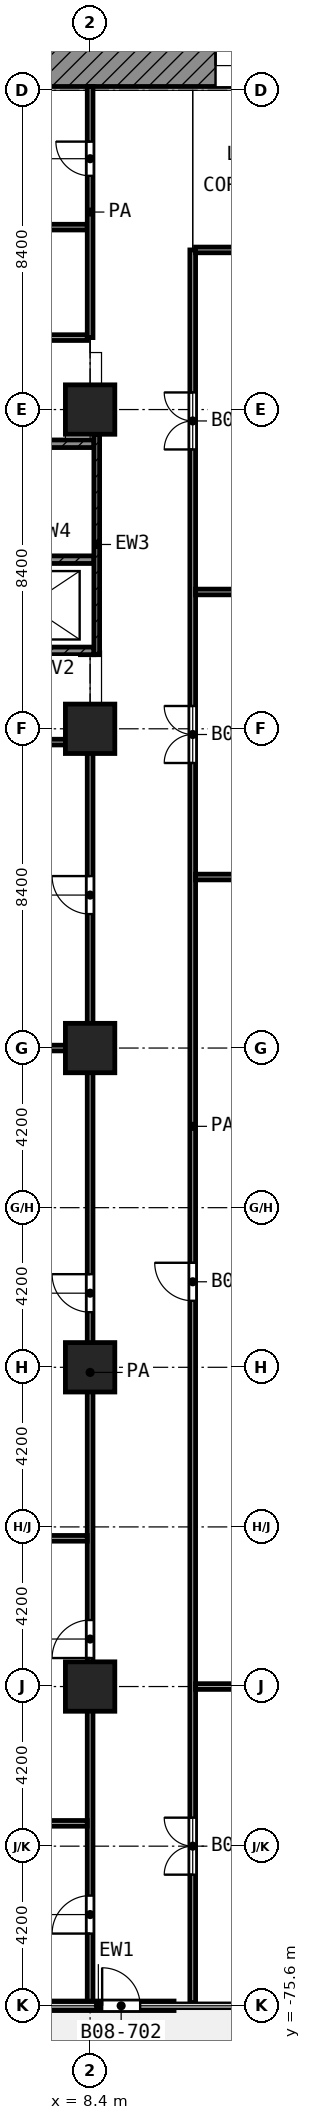
"""IFC4 building model, lengths in metres.
Left out: names, types, materials, properties, quantities, classifications, styles, units other than length and angle.
Written with IfcOpenShell. Run it as: python <this file> out.ifc"""

import sys

from ifc_helpers import new_model, si_unit, direction, frame, frame_2d, origin, origin_2d, place, context, subcontext, project, spatial, rectangle, extrude, element, fill, save


model = new_model("IFC4")
c1 = context("Model", 3, precision=1e-05, world=origin(), true_north=direction((0.0, 1.0)))
c2 = subcontext(c1, "Body", "Model", "MODEL_VIEW")
j1 = project(units=[si_unit("LENGTHUNIT", "METRE"), si_unit("PLANEANGLEUNIT", "RADIAN")], contexts=[c1])
p1 = place(None, origin())
s1 = spatial("IfcSite", under=j1, at=p1, CompositionType="ELEMENT")
p2 = place(p1, origin())
s2 = spatial("IfcBuilding", under=s1, at=p2, CompositionType="ELEMENT")
p3 = place(p2, frame((0.0, 0.0, 39.2)))
s3 = spatial("IfcBuildingStorey", under=s2, at=p3, CompositionType="ELEMENT", Elevation=39.2)
for number, where, z_axis, x_axis in (
    (1, (8.4, -33.6, 0.0), (0.0, 0.0, 1.0), (1.0, 0.0, 0.0)),
    (2, (8.4, -42.0, 0.0), (0.0, 0.0, 1.0), (1.0, 0.0, 0.0)),
    (3, (8.4, -50.4, 0.0), (0.0, 0.0, 1.0), (1.0, 0.0, 0.0)),
    (4, (8.4, -58.8, 0.0), (0.0, 0.0, 1.0), (1.0, 0.0, 0.0)),
    (5, (8.4, -67.2, 0.0), (0.0, 0.0, 1.0), (1.0, 0.0, 0.0)),
):
    element("IfcColumn", number, at=place(p3, frame(where, z_axis=z_axis, x_axis=x_axis)), inside=s3, PredefinedType="COLUMN", context=c2, shape_type="SweptSolid", body=[
        extrude(rectangle(XDim=1.3, YDim=1.3, at=origin_2d()), origin(), (0.0, 0.0, 1.0), 4.2),
    ])
p4 = place(p3, frame((6.625, -75.6, 0.0), z_axis=(0.0, 0.0, 1.0), x_axis=(1.0, 0.0, 0.0)))
e6 = element("IfcWall", 6, at=p4, inside=s3, PredefinedType="SOLIDWALL", context=c2, shape_type="SweptSolid", body=[
    extrude(rectangle(XDim=3.983, YDim=0.25, at=frame_2d((1.992, 0.0))), origin(), (0.0, 0.0, 1.0), 3.78),
])
p5 = place(p4, frame((2.092, 0.0, 0.0)))
e7 = element("IfcOpeningElement", 7, at=p5, cuts=e6, PredefinedType="OPENING", context=c2, shape_type="SweptSolid", body=[
    extrude(rectangle(XDim=1.0, YDim=2.1, at=frame_2d((0.5, 1.05))), frame((0.0, 0.135, 0.0), z_axis=(0.0, -1.0, 0.0), x_axis=(1.0, 0.0, 0.0)), (0.0, 0.0, 1.0), 0.27),
])
p6 = place(p3, frame((5.4, -24.55, 0.0), z_axis=(0.0, 0.0, 1.0), x_axis=(1.0, 0.0, 0.0)))
e8 = element("IfcWall", 8, at=p6, inside=s3, PredefinedType="SHEAR", context=c2, shape_type="SweptSolid", body=[
    extrude(rectangle(XDim=18.6, YDim=1.1, at=frame_2d((9.3, 0.0))), origin(), (0.0, 0.0, 1.0), 3.9),
])
p7 = place(p6, frame((6.3, 0.0, 0.0)))
e9 = element("IfcOpeningElement", 9, at=p7, cuts=e8, PredefinedType="OPENING", context=c2, shape_type="SweptSolid", body=[
    extrude(rectangle(XDim=1.8, YDim=2.1, at=frame_2d((0.9, 1.05))), frame((0.0, 0.56, 0.0), z_axis=(0.0, -1.0, 0.0), x_axis=(1.0, 0.0, 0.0)), (0.0, 0.0, 1.0), 1.12),
])
p8 = place(p3, frame((8.575, -40.05, 0.0), z_axis=(0.0, 0.0, 1.0), x_axis=(0.0, 1.0, 0.0)))
e10 = element("IfcWall", 10, at=p8, inside=s3, PredefinedType="SHEAR", context=c2, shape_type="SweptSolid", body=[
    extrude(rectangle(XDim=5.8, YDim=0.15, at=frame_2d((2.9, 0.0))), origin(), (0.0, 0.0, 1.0), 3.9),
])
p9 = place(p3, frame((0.45, -34.5, 0.0), z_axis=(0.0, 0.0, 1.0), x_axis=(1.0, 0.0, 0.0)))
e11 = element("IfcWall", 11, at=p9, inside=s3, PredefinedType="SHEAR", context=c2, shape_type="SweptSolid", body=[
    extrude(rectangle(XDim=8.05, YDim=0.2, at=frame_2d((4.025, 0.0))), origin(), (0.0, 0.0, 1.0), 3.9),
])
p10 = place(p9, frame((0.75, 0.0, 0.0)))
e12 = element("IfcOpeningElement", 12, at=p10, cuts=e11, PredefinedType="OPENING", context=c2, shape_type="SweptSolid", body=[
    extrude(rectangle(XDim=1.1, YDim=2.1, at=frame_2d((0.55, 1.05))), frame((0.0, 0.11, 0.0), z_axis=(0.0, -1.0, 0.0), x_axis=(1.0, 0.0, 0.0)), (0.0, 0.0, 1.0), 0.22),
])
p11 = place(p3, frame((0.45, -37.55, 0.0), z_axis=(0.0, 0.0, 1.0), x_axis=(1.0, 0.0, 0.0)))
e13 = element("IfcWall", 13, at=p11, inside=s3, PredefinedType="SHEAR", context=c2, shape_type="SweptSolid", body=[
    extrude(rectangle(XDim=8.05, YDim=0.2, at=frame_2d((4.025, 0.0))), origin(), (0.0, 0.0, 1.0), 3.9),
])
p12 = place(p11, frame((0.1, 0.0, 0.0)))
e14 = element("IfcOpeningElement", 14, at=p12, cuts=e13, PredefinedType="OPENING", context=c2, shape_type="SweptSolid", body=[
    extrude(rectangle(XDim=1.1, YDim=2.1, at=frame_2d((0.55, 1.05))), frame((0.0, 0.11, 0.0), z_axis=(0.0, -1.0, 0.0), x_axis=(1.0, 0.0, 0.0)), (0.0, 0.0, 1.0), 0.22),
])
p13 = place(p3, frame((0.45, -39.95, 0.0), z_axis=(0.0, 0.0, 1.0), x_axis=(1.0, 0.0, 0.0)))
e15 = element("IfcWall", 15, at=p13, inside=s3, PredefinedType="SHEAR", context=c2, shape_type="SweptSolid", body=[
    extrude(rectangle(XDim=8.05, YDim=0.2, at=frame_2d((4.025, 0.0))), origin(), (0.0, 0.0, 1.0), 3.9),
])
p14 = place(p13, frame((2.0, 0.0, 0.0)))
e16 = element("IfcOpeningElement", 16, at=p14, cuts=e15, PredefinedType="OPENING", context=c2, shape_type="SweptSolid", body=[
    extrude(rectangle(XDim=1.1, YDim=2.1, at=frame_2d((0.55, 1.05))), frame((0.0, 0.11, 0.0), z_axis=(0.0, -1.0, 0.0), x_axis=(1.0, 0.0, 0.0)), (0.0, 0.0, 1.0), 0.22),
])
p15 = place(p3, frame((1.313, -70.8, 0.0), z_axis=(0.0, 0.0, 1.0), x_axis=(1.0, 0.0, 0.0)))
e17 = element("IfcWall", 17, at=p15, inside=s3, PredefinedType="PARTITIONING", context=c2, shape_type="SweptSolid", body=[
    extrude(rectangle(XDim=7.012, YDim=0.15, at=frame_2d((3.506, 0.0))), origin(), (0.0, 0.0, 1.0), 3.9),
])
p16 = place(p3, frame((11.175, -67.2, 0.0), z_axis=(0.0, 0.0, 1.0), x_axis=(1.0, 0.0, 0.0)))
e18 = element("IfcWall", 18, at=p16, inside=s3, PredefinedType="PARTITIONING", context=c2, shape_type="SweptSolid", body=[
    extrude(rectangle(XDim=13.945, YDim=0.15, at=frame_2d((6.973, 0.0))), origin(), (0.0, 0.0, 1.0), 3.9),
])
for number, where, z_axis, x_axis in (
    (19, (0.08, -63.3, 0.0), (0.0, 0.0, 1.0), (1.0, 0.0, 0.0)),
    (20, (0.08, -50.4, 0.0), (0.0, 0.0, 1.0), (1.0, 0.0, 0.0)),
):
    element("IfcWall", number, at=place(p3, frame(where, z_axis=z_axis, x_axis=x_axis)), inside=s3, PredefinedType="PARTITIONING", context=c2, shape_type="SweptSolid", body=[
        extrude(rectangle(XDim=8.245, YDim=0.15, at=frame_2d((4.123, 0.0))), origin(), (0.0, 0.0, 1.0), 3.9),
    ])
p17 = place(p3, frame((11.175, -45.9, 0.0), z_axis=(0.0, 0.0, 1.0), x_axis=(1.0, 0.0, 0.0)))
e21 = element("IfcWall", 21, at=p17, inside=s3, PredefinedType="PARTITIONING", context=c2, shape_type="SweptSolid", body=[
    extrude(rectangle(XDim=13.945, YDim=0.15, at=frame_2d((6.973, 0.0))), origin(), (0.0, 0.0, 1.0), 3.9),
])
p18 = place(p3, frame((2.325, -42.35, 0.0), z_axis=(0.0, 0.0, 1.0), x_axis=(1.0, 0.0, 0.0)))
e22 = element("IfcWall", 22, at=p18, inside=s3, PredefinedType="PARTITIONING", context=c2, shape_type="SweptSolid", body=[
    extrude(rectangle(XDim=6.0, YDim=0.15, at=frame_2d((3.0, 0.0))), origin(), (0.0, 0.0, 1.0), 3.9),
])
p19 = place(p3, frame((11.175, -38.4, 0.0), z_axis=(0.0, 0.0, 1.0), x_axis=(1.0, 0.0, 0.0)))
e23 = element("IfcWall", 23, at=p19, inside=s3, PredefinedType="PARTITIONING", context=c2, shape_type="SweptSolid", body=[
    extrude(rectangle(XDim=13.945, YDim=0.15, at=frame_2d((6.973, 0.0))), origin(), (0.0, 0.0, 1.0), 3.9),
])
p20 = place(p3, frame((0.08, -31.707, 0.0), z_axis=(0.0, 0.0, 1.0), x_axis=(1.0, 0.0, 0.0)))
e24 = element("IfcWall", 24, at=p20, inside=s3, PredefinedType="PARTITIONING", context=c2, shape_type="SweptSolid", body=[
    extrude(rectangle(XDim=8.245, YDim=0.15, at=frame_2d((4.123, 0.0))), origin(), (0.0, 0.0, 1.0), 3.9),
])
p21 = place(p20, frame((3.62, 0.0, 0.0)))
e25 = element("IfcOpeningElement", 25, at=p21, cuts=e24, PredefinedType="OPENING", context=c2, shape_type="SweptSolid", body=[
    extrude(rectangle(XDim=1.0, YDim=2.1, at=frame_2d((0.5, 1.05))), frame((0.0, 0.085, 0.0), z_axis=(0.0, -1.0, 0.0), x_axis=(1.0, 0.0, 0.0)), (0.0, 0.0, 1.0), 0.17),
])
p22 = place(p3, frame((11.175, -29.4, 0.0), z_axis=(0.0, 0.0, 1.0), x_axis=(1.0, 0.0, 0.0)))
e26 = element("IfcWall", 26, at=p22, inside=s3, PredefinedType="PARTITIONING", context=c2, shape_type="SweptSolid", body=[
    extrude(rectangle(XDim=2.925, YDim=0.15, at=frame_2d((1.462, 0.0))), origin(), (0.0, 0.0, 1.0), 3.9),
])
p23 = place(p3, frame((0.08, -28.8, 0.0), z_axis=(0.0, 0.0, 1.0), x_axis=(1.0, 0.0, 0.0)))
e27 = element("IfcWall", 27, at=p23, inside=s3, PredefinedType="PARTITIONING", context=c2, shape_type="SweptSolid", body=[
    extrude(rectangle(XDim=8.245, YDim=0.15, at=frame_2d((4.123, 0.0))), origin(), (0.0, 0.0, 1.0), 3.9),
])
p24 = place(p3, frame((8.4, -75.52, 0.0), z_axis=(0.0, 0.0, 1.0), x_axis=(0.0, 1.0, 0.0)))
e28 = element("IfcWall", 28, at=p24, inside=s3, PredefinedType="PARTITIONING", context=c2, shape_type="SweptSolid", body=[
    extrude(rectangle(XDim=33.17, YDim=0.15, at=frame_2d((16.585, 0.0))), origin(), (0.0, 0.0, 1.0), 3.9),
])
p25 = place(p24, frame((28.645, 0.0, 0.0)))
e29 = element("IfcOpeningElement", 29, at=p25, cuts=e28, PredefinedType="OPENING", context=c2, shape_type="SweptSolid", body=[
    extrude(rectangle(XDim=1.0, YDim=2.1, at=frame_2d((0.5, 1.05))), frame((0.0, 0.085, 0.0), z_axis=(0.0, -1.0, 0.0), x_axis=(1.0, 0.0, 0.0)), (0.0, 0.0, 1.0), 0.17),
])
p26 = place(p24, frame((18.17, 0.0, 0.0)))
e30 = element("IfcOpeningElement", 30, at=p26, cuts=e28, PredefinedType="OPENING", context=c2, shape_type="SweptSolid", body=[
    extrude(rectangle(XDim=1.0, YDim=2.1, at=frame_2d((0.5, 1.05))), frame((0.0, 0.085, 0.0), z_axis=(0.0, -1.0, 0.0), x_axis=(1.0, 0.0, 0.0)), (0.0, 0.0, 1.0), 0.17),
])
p27 = place(p24, frame((9.07, 0.0, 0.0)))
e31 = element("IfcOpeningElement", 31, at=p27, cuts=e28, PredefinedType="OPENING", context=c2, shape_type="SweptSolid", body=[
    extrude(rectangle(XDim=1.0, YDim=2.1, at=frame_2d((0.5, 1.05))), frame((0.0, 0.085, 0.0), z_axis=(0.0, -1.0, 0.0), x_axis=(1.0, 0.0, 0.0)), (0.0, 0.0, 1.0), 0.17),
])
p28 = place(p24, frame((1.82, 0.0, 0.0)))
e32 = element("IfcOpeningElement", 32, at=p28, cuts=e28, PredefinedType="OPENING", context=c2, shape_type="SweptSolid", body=[
    extrude(rectangle(XDim=1.0, YDim=2.1, at=frame_2d((0.5, 1.05))), frame((0.0, 0.085, 0.0), z_axis=(0.0, -1.0, 0.0), x_axis=(1.0, 0.0, 0.0)), (0.0, 0.0, 1.0), 0.17),
])
p29 = place(p3, frame((8.4, -31.707, 0.0), z_axis=(0.0, 0.0, 1.0), x_axis=(0.0, 1.0, 0.0)))
e33 = element("IfcWall", 33, at=p29, inside=s3, PredefinedType="PARTITIONING", context=c2, shape_type="SweptSolid", body=[
    extrude(rectangle(XDim=6.607, YDim=0.15, at=frame_2d((3.303, 0.0))), origin(), (0.0, 0.0, 1.0), 3.9),
])
p30 = place(p29, frame((4.257, 0.0, 0.0)))
e34 = element("IfcOpeningElement", 34, at=p30, cuts=e33, PredefinedType="OPENING", context=c2, shape_type="SweptSolid", body=[
    extrude(rectangle(XDim=0.9, YDim=2.1, at=frame_2d((0.45, 1.05))), frame((0.0, 0.085, 0.0), z_axis=(0.0, -1.0, 0.0), x_axis=(1.0, 0.0, 0.0)), (0.0, 0.0, 1.0), 0.17),
])
p31 = place(p3, frame((11.1, -75.52, 0.0), z_axis=(0.0, 0.0, 1.0), x_axis=(0.0, 1.0, 0.0)))
e35 = element("IfcWall", 35, at=p31, inside=s3, PredefinedType="PARTITIONING", context=c2, shape_type="SweptSolid", body=[
    extrude(rectangle(XDim=46.12, YDim=0.15, at=frame_2d((23.06, 0.0))), origin(), (0.0, 0.0, 1.0), 3.9),
])
p32 = place(p31, frame((40.87, 0.0, 0.0)))
e36 = element("IfcOpeningElement", 36, at=p32, cuts=e35, PredefinedType="OPENING", context=c2, shape_type="SweptSolid", body=[
    extrude(rectangle(XDim=1.5, YDim=2.1, at=frame_2d((0.75, 1.05))), frame((0.0, 0.085, 0.0), z_axis=(0.0, -1.0, 0.0), x_axis=(1.0, 0.0, 0.0)), (0.0, 0.0, 1.0), 0.17),
])
p33 = place(p31, frame((32.62, 0.0, 0.0)))
e37 = element("IfcOpeningElement", 37, at=p33, cuts=e35, PredefinedType="OPENING", context=c2, shape_type="SweptSolid", body=[
    extrude(rectangle(XDim=1.5, YDim=2.1, at=frame_2d((0.75, 1.05))), frame((0.0, 0.085, 0.0), z_axis=(0.0, -1.0, 0.0), x_axis=(1.0, 0.0, 0.0)), (0.0, 0.0, 1.0), 0.17),
])
p34 = place(p31, frame((18.47, 0.0, 0.0)))
e38 = element("IfcOpeningElement", 38, at=p34, cuts=e35, PredefinedType="OPENING", context=c2, shape_type="SweptSolid", body=[
    extrude(rectangle(XDim=1.0, YDim=2.1, at=frame_2d((0.5, 1.05))), frame((0.0, 0.085, 0.0), z_axis=(0.0, -1.0, 0.0), x_axis=(1.0, 0.0, 0.0)), (0.0, 0.0, 1.0), 0.17),
])
p35 = place(p31, frame((3.37, 0.0, 0.0)))
e39 = element("IfcOpeningElement", 39, at=p35, cuts=e35, PredefinedType="OPENING", context=c2, shape_type="SweptSolid", body=[
    extrude(rectangle(XDim=1.5, YDim=2.1, at=frame_2d((0.75, 1.05))), frame((0.0, 0.085, 0.0), z_axis=(0.0, -1.0, 0.0), x_axis=(1.0, 0.0, 0.0)), (0.0, 0.0, 1.0), 0.17),
])
p36 = place(p5, origin())
e40 = element("IfcDoor", 40, at=p36, inside=s3, OperationType="SINGLE_SWING_LEFT", PredefinedType="DOOR", context=c2, shape_type="SweptSolid", body=[
    extrude(rectangle(XDim=1.0, YDim=2.1, at=frame_2d((0.5, 1.05))), frame((0.0, 0.025, 0.0), z_axis=(0.0, -1.0, 0.0), x_axis=(1.0, 0.0, 0.0)), (0.0, 0.0, 1.0), 0.05),
])
fill(e7, e40)
p37 = place(p7, origin())
e41 = element("IfcDoor", 41, at=p37, inside=s3, OperationType="DOUBLE_DOOR_SINGLE_SWING", PredefinedType="DOOR", context=c2, shape_type="SweptSolid", body=[
    extrude(rectangle(XDim=1.8, YDim=2.1, at=frame_2d((0.9, 1.05))), frame((0.0, 0.025, 0.0), z_axis=(0.0, -1.0, 0.0), x_axis=(1.0, 0.0, 0.0)), (0.0, 0.0, 1.0), 0.05),
])
fill(e9, e41)
p38 = place(p30, origin())
e42 = element("IfcDoor", 42, at=p38, inside=s3, OperationType="SINGLE_SWING_RIGHT", PredefinedType="DOOR", context=c2, shape_type="SweptSolid", body=[
    extrude(rectangle(XDim=0.9, YDim=2.1, at=frame_2d((0.45, 1.05))), frame((0.0, 0.025, 0.0), z_axis=(0.0, -1.0, 0.0), x_axis=(1.0, 0.0, 0.0)), (0.0, 0.0, 1.0), 0.05),
])
fill(e34, e42)
p39 = place(p25, origin())
e43 = element("IfcDoor", 43, at=p39, inside=s3, OperationType="SINGLE_SWING_RIGHT", PredefinedType="DOOR", context=c2, shape_type="SweptSolid", body=[
    extrude(rectangle(XDim=1.0, YDim=2.1, at=frame_2d((0.5, 1.05))), frame((0.0, 0.025, 0.0), z_axis=(0.0, -1.0, 0.0), x_axis=(1.0, 0.0, 0.0)), (0.0, 0.0, 1.0), 0.05),
])
fill(e29, e43)
p40 = place(p26, origin())
e44 = element("IfcDoor", 44, at=p40, inside=s3, OperationType="SINGLE_SWING_RIGHT", PredefinedType="DOOR", context=c2, shape_type="SweptSolid", body=[
    extrude(rectangle(XDim=1.0, YDim=2.1, at=frame_2d((0.5, 1.05))), frame((0.0, 0.025, 0.0), z_axis=(0.0, -1.0, 0.0), x_axis=(1.0, 0.0, 0.0)), (0.0, 0.0, 1.0), 0.05),
])
fill(e30, e44)
p41 = place(p27, origin())
e45 = element("IfcDoor", 45, at=p41, inside=s3, OperationType="SINGLE_SWING_LEFT", PredefinedType="DOOR", context=c2, shape_type="SweptSolid", body=[
    extrude(rectangle(XDim=1.0, YDim=2.1, at=frame_2d((0.5, 1.05))), frame((0.0, 0.025, 0.0), z_axis=(0.0, -1.0, 0.0), x_axis=(1.0, 0.0, 0.0)), (0.0, 0.0, 1.0), 0.05),
])
fill(e31, e45)
p42 = place(p28, origin())
e46 = element("IfcDoor", 46, at=p42, inside=s3, OperationType="SINGLE_SWING_LEFT", PredefinedType="DOOR", context=c2, shape_type="SweptSolid", body=[
    extrude(rectangle(XDim=1.0, YDim=2.1, at=frame_2d((0.5, 1.05))), frame((0.0, 0.025, 0.0), z_axis=(0.0, -1.0, 0.0), x_axis=(1.0, 0.0, 0.0)), (0.0, 0.0, 1.0), 0.05),
])
fill(e32, e46)
p43 = place(p32, origin())
e47 = element("IfcDoor", 47, at=p43, inside=s3, OperationType="DOUBLE_DOOR_SINGLE_SWING", PredefinedType="DOOR", context=c2, shape_type="SweptSolid", body=[
    extrude(rectangle(XDim=1.5, YDim=2.1, at=frame_2d((0.75, 1.05))), frame((0.0, 0.025, 0.0), z_axis=(0.0, -1.0, 0.0), x_axis=(1.0, 0.0, 0.0)), (0.0, 0.0, 1.0), 0.05),
])
fill(e36, e47)
p44 = place(p33, origin())
e48 = element("IfcDoor", 48, at=p44, inside=s3, OperationType="DOUBLE_DOOR_SINGLE_SWING", PredefinedType="DOOR", context=c2, shape_type="SweptSolid", body=[
    extrude(rectangle(XDim=1.5, YDim=2.1, at=frame_2d((0.75, 1.05))), frame((0.0, 0.025, 0.0), z_axis=(0.0, -1.0, 0.0), x_axis=(1.0, 0.0, 0.0)), (0.0, 0.0, 1.0), 0.05),
])
fill(e37, e48)
p45 = place(p34, origin())
e49 = element("IfcDoor", 49, at=p45, inside=s3, OperationType="SINGLE_SWING_RIGHT", PredefinedType="DOOR", context=c2, shape_type="SweptSolid", body=[
    extrude(rectangle(XDim=1.0, YDim=2.1, at=frame_2d((0.5, 1.05))), frame((0.0, 0.025, 0.0), z_axis=(0.0, -1.0, 0.0), x_axis=(1.0, 0.0, 0.0)), (0.0, 0.0, 1.0), 0.05),
])
fill(e38, e49)
p46 = place(p35, origin())
e50 = element("IfcDoor", 50, at=p46, inside=s3, OperationType="DOUBLE_DOOR_SINGLE_SWING", PredefinedType="DOOR", context=c2, shape_type="SweptSolid", body=[
    extrude(rectangle(XDim=1.5, YDim=2.1, at=frame_2d((0.75, 1.05))), frame((0.0, 0.025, 0.0), z_axis=(0.0, -1.0, 0.0), x_axis=(1.0, 0.0, 0.0)), (0.0, 0.0, 1.0), 0.05),
])
fill(e39, e50)
save(model, sys.argv[1])
